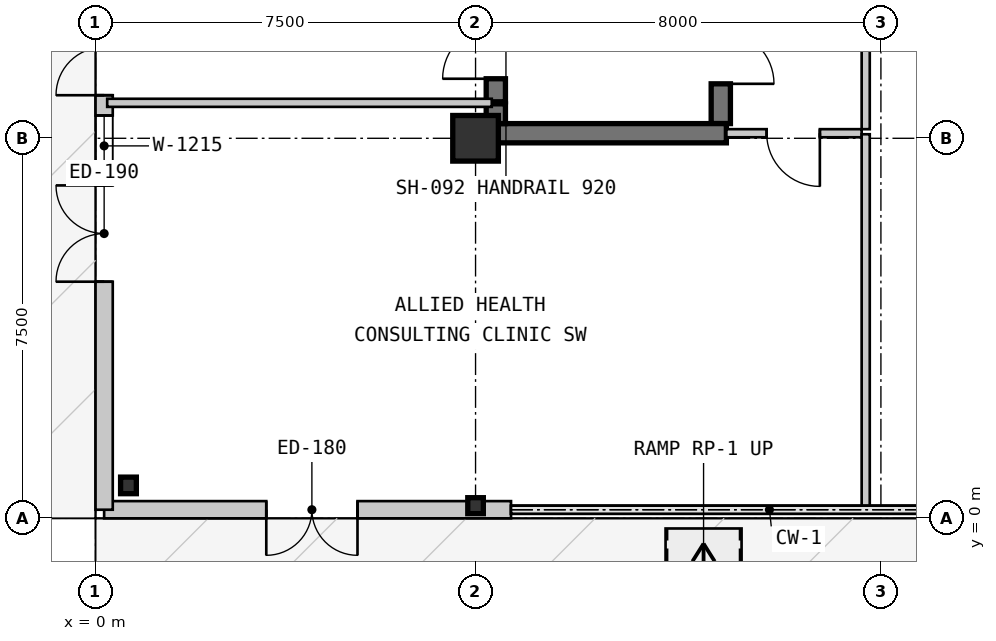
"""IFC4 building model, lengths in metres.
Left out: names, types, materials, properties, quantities, classifications, styles, units other than length and angle.
Written with IfcOpenShell. Run it as: python <this file> out.ifc"""

import sys

from ifc_helpers import new_model, si_unit, direction, frame, frame_2d, origin, origin_2d, place, context, subcontext, project, spatial, rectangle, circle, i_section, extrude, source, transform, mapped, element, fill, save


model = new_model("IFC4")
c1 = context("Model", 3, precision=1e-05, world=origin(), true_north=direction((0.0, 1.0)))
c2 = subcontext(c1, "Body", "Model", "MODEL_VIEW")
j1 = project(units=[si_unit("LENGTHUNIT", "METRE"), si_unit("PLANEANGLEUNIT", "RADIAN")], contexts=[c1])
p1 = place(None, origin())
s1 = spatial("IfcSite", under=j1, at=p1, CompositionType="ELEMENT")
p2 = place(p1, origin())
s2 = spatial("IfcBuilding", under=s1, at=p2, CompositionType="ELEMENT")
p3 = place(p2, origin())
s3 = spatial("IfcBuildingStorey", under=s2, at=p3, CompositionType="ELEMENT", Elevation=0.0)
m1 = source(origin(), c2, "Body", "SweptSolid", [
    extrude(circle(Radius=0.45, at=origin_2d()), origin(), (0.0, 0.0, 1.0), 4.55),
])
p4 = place(p3, frame((7.5, 7.5, 0.0), z_axis=(0.0, 0.0, 1.0), x_axis=(1.0, 0.0, 0.0)))
e1 = element("IfcColumn", 1, at=p4, inside=s3, PredefinedType="COLUMN", context=c2, shape_type="MappedRepresentation", body=[
    mapped(m1, transform((0.0, 0.0, 0.0), scale=1.0)),
])
m2 = source(origin(), c2, "Body", "SweptSolid", [
    extrude(i_section(OverallWidth=0.311, OverallDepth=0.327, WebThickness=0.016, FlangeThickness=0.025, at=origin_2d()), origin(), (0.0, 0.0, 1.0), 4.55),
])
p5 = place(p3, frame((0.65, 0.65, 0.0), z_axis=(0.0, 0.0, 1.0), x_axis=(1.0, 0.0, 0.0)))
e2 = element("IfcColumn", 2, at=p5, inside=s3, PredefinedType="COLUMN", context=c2, shape_type="MappedRepresentation", body=[
    mapped(m2, transform((0.0, 0.0, 0.0), scale=1.0)),
])
m3 = source(origin(), c2, "Body", "SweptSolid", [
    extrude(i_section(OverallWidth=0.307, OverallDepth=0.315, WebThickness=0.012, FlangeThickness=0.019, at=origin_2d()), origin(), (0.0, 0.0, 1.0), 4.55),
])
p6 = place(p3, frame((7.5, 0.25, 0.0), z_axis=(0.0, 0.0, 1.0), x_axis=(1.0, 0.0, 0.0)))
e3 = element("IfcColumn", 3, at=p6, inside=s3, PredefinedType="PILASTER", context=c2, shape_type="MappedRepresentation", body=[
    mapped(m3, transform((0.0, 0.0, 0.0), scale=1.0)),
])
m4 = source(origin(), c2, "Body", "SweptSolid", [
    extrude(rectangle(XDim=8.03, YDim=0.34, at=frame_2d((4.015, 0.0))), origin(), (0.0, 0.0, 1.0), 4.29),
])
p7 = place(p3, frame((0.17, 0.17, 0.0), z_axis=(0.0, 0.0, 1.0), x_axis=(1.0, 0.0, 0.0)))
e4 = element("IfcWall", 4, at=p7, inside=s3, PredefinedType="SOLIDWALL", context=c2, shape_type="MappedRepresentation", body=[
    mapped(m4, transform((0.0, 0.0, 0.0), scale=1.0)),
])
m5 = source(origin(), c2, "Body", "SweptSolid", [
    extrude(rectangle(XDim=1.8, YDim=2.3, at=frame_2d((0.9, 1.15))), frame((0.0, 0.18, 0.0), z_axis=(0.0, -1.0, 0.0), x_axis=(1.0, 0.0, 0.0)), (0.0, 0.0, 1.0), 0.36),
])
p8 = place(p7, frame((3.2, 0.0, 0.0)))
e5 = element("IfcOpeningElement", 5, at=p8, cuts=e4, PredefinedType="OPENING", context=c2, shape_type="MappedRepresentation", body=[
    mapped(m5, transform((0.0, 0.0, 0.0), scale=1.0)),
])
m6 = source(origin(), c2, "Body", "SweptSolid", [
    extrude(rectangle(XDim=39.66, YDim=0.34, at=frame_2d((19.83, 0.0))), origin(), (0.0, 0.0, 1.0), 4.29),
])
p9 = place(p3, frame((0.17, 0.17, 0.0), z_axis=(0.0, 0.0, 1.0), x_axis=(0.0, 1.0, 0.0)))
e6 = element("IfcWall", 6, at=p9, inside=s3, PredefinedType="SOLIDWALL", context=c2, shape_type="MappedRepresentation", body=[
    mapped(m6, transform((0.0, 0.0, 0.0), scale=1.0)),
])
m7 = source(origin(), c2, "Body", "SweptSolid", [
    extrude(rectangle(XDim=1.9, YDim=2.4, at=frame_2d((0.95, 1.2))), frame((0.0, 0.18, 0.0), z_axis=(0.0, -1.0, 0.0), x_axis=(1.0, 0.0, 0.0)), (0.0, 0.0, 1.0), 0.36),
])
p10 = place(p9, frame((4.5, 0.0, 0.0)))
e7 = element("IfcOpeningElement", 7, at=p10, cuts=e6, PredefinedType="OPENING", context=c2, shape_type="MappedRepresentation", body=[
    mapped(m7, transform((0.0, 0.0, 0.0), scale=1.0)),
])
p11 = place(p9, frame((17.5, 0.0, 0.0)))
e8 = element("IfcOpeningElement", 8, at=p11, cuts=e6, PredefinedType="OPENING", context=c2, shape_type="MappedRepresentation", body=[
    mapped(m7, transform((0.0, 0.0, 0.0), scale=1.0)),
])
p12 = place(p9, frame((28.0, 0.0, 0.0)))
e9 = element("IfcOpeningElement", 9, at=p12, cuts=e6, PredefinedType="OPENING", context=c2, shape_type="MappedRepresentation", body=[
    mapped(m7, transform((0.0, 0.0, 0.0), scale=1.0)),
])
p13 = place(p9, frame((8.18, 0.0, 0.0)))
e10 = element("IfcOpeningElement", 10, at=p13, cuts=e6, PredefinedType="OPENING", context=c2, shape_type="MappedRepresentation", body=[
    mapped(m7, transform((0.0, 0.0, 0.0), scale=1.0)),
])
m8 = source(origin(), c2, "Body", "SweptSolid", [
    extrude(rectangle(XDim=1.2, YDim=1.5, at=frame_2d((0.6, 0.75))), frame((0.0, 0.18, 0.0), z_axis=(0.0, -1.0, 0.0), x_axis=(1.0, 0.0, 0.0)), (0.0, 0.0, 1.0), 0.36),
])
p14 = place(p9, frame((6.58, 0.0, 0.95)))
e11 = element("IfcOpeningElement", 11, at=p14, cuts=e6, PredefinedType="OPENING", context=c2, shape_type="MappedRepresentation", body=[
    mapped(m8, transform((0.0, 0.0, 0.0), scale=1.0)),
])
m9 = source(origin(), c2, "Body", "SweptSolid", [
    extrude(rectangle(XDim=2.1, YDim=1.6, at=frame_2d((1.05, 0.8))), frame((0.0, 0.18, 0.0), z_axis=(0.0, -1.0, 0.0), x_axis=(1.0, 0.0, 0.0)), (0.0, 0.0, 1.0), 0.36),
])
p15 = place(p9, frame((34.0, 0.0, 0.95)))
e12 = element("IfcOpeningElement", 12, at=p15, cuts=e6, PredefinedType="OPENING", context=c2, shape_type="MappedRepresentation", body=[
    mapped(m9, transform((0.0, 0.0, 0.0), scale=1.0)),
])
m10 = source(origin(), c2, "Body", "SweptSolid", [
    extrude(rectangle(XDim=8.22, YDim=0.38, at=frame_2d((4.11, 0.0))), origin(), (0.0, 0.0, 1.0), 4.29),
])
p16 = place(p3, frame((12.34, 16.01, 0.0), z_axis=(0.0, 0.0, 1.0), x_axis=(0.0, -1.0, 0.0)))
e13 = element("IfcWall", 13, at=p16, inside=s3, PredefinedType="SHEAR", context=c2, shape_type="MappedRepresentation", body=[
    mapped(m10, transform((0.0, 0.0, 0.0), scale=1.0)),
])
m11 = source(origin(), c2, "Body", "SweptSolid", [
    extrude(rectangle(XDim=1.05, YDim=2.1, at=frame_2d((0.525, 1.05))), frame((0.0, 0.2, 0.0), z_axis=(0.0, -1.0, 0.0), x_axis=(1.0, 0.0, 0.0)), (0.0, 0.0, 1.0), 0.4),
])
p17 = place(p16, frame((6.385, 0.0, 0.0)))
e14 = element("IfcOpeningElement", 14, at=p17, cuts=e13, PredefinedType="OPENING", context=c2, shape_type="MappedRepresentation", body=[
    mapped(m11, transform((0.0, 0.0, 0.0), scale=1.0)),
])
m12 = source(origin(), c2, "Body", "SweptSolid", [
    extrude(rectangle(XDim=4.66, YDim=0.38, at=frame_2d((2.33, 0.0))), origin(), (0.0, 0.0, 1.0), 4.29),
])
p18 = place(p3, frame((12.45, 7.6, 0.0), z_axis=(0.0, 0.0, 1.0), x_axis=(-1.0, 0.0, 0.0)))
e15 = element("IfcWall", 15, at=p18, inside=s3, PredefinedType="SHEAR", context=c2, shape_type="MappedRepresentation", body=[
    mapped(m12, transform((0.0, 0.0, 0.0), scale=1.0)),
])
m13 = source(origin(), c2, "Body", "SweptSolid", [
    extrude(rectangle(XDim=0.39, YDim=0.38, at=frame_2d((0.195, 0.0))), origin(), (0.0, 0.0, 1.0), 4.29),
])
p19 = place(p3, frame((7.9, 7.79, 0.0), z_axis=(0.0, 0.0, 1.0), x_axis=(0.0, 1.0, 0.0)))
e16 = element("IfcWall", 16, at=p19, inside=s3, PredefinedType="SHEAR", context=c2, shape_type="MappedRepresentation", body=[
    mapped(m13, transform((0.0, 0.0, 0.0), scale=1.0)),
])
m14 = source(origin(), c2, "Body", "SweptSolid", [
    extrude(rectangle(XDim=2.16, YDim=0.38, at=frame_2d((1.08, 0.0))), origin(), (0.0, 0.0, 1.0), 4.29),
])
p20 = place(p3, frame((7.9, 8.22, 0.0), z_axis=(0.0, 0.0, 1.0), x_axis=(0.0, 1.0, 0.0)))
e17 = element("IfcWall", 17, at=p20, inside=s3, PredefinedType="SHEAR", context=c2, shape_type="MappedRepresentation", body=[
    mapped(m14, transform((0.0, 0.0, 0.0), scale=1.0)),
])
p21 = place(p20, frame((0.455, 0.0, 0.0)))
e18 = element("IfcOpeningElement", 18, at=p21, cuts=e17, PredefinedType="OPENING", context=c2, shape_type="MappedRepresentation", body=[
    mapped(m11, transform((0.0, 0.0, 0.0), scale=1.0)),
])
m15 = source(origin(), c2, "Body", "SweptSolid", [
    extrude(rectangle(XDim=13.44, YDim=0.16, at=frame_2d((6.72, 0.0))), origin(), (0.0, 0.0, 1.0), 4.29),
])
p22 = place(p3, frame((15.2, 21.12, 0.0), z_axis=(0.0, 0.0, 1.0), x_axis=(0.0, -1.0, 0.0)))
e19 = element("IfcWall", 19, at=p22, inside=s3, PredefinedType="PARTITIONING", context=c2, shape_type="MappedRepresentation", body=[
    mapped(m15, transform((0.0, 0.0, 0.0), scale=1.0)),
])
m16 = source(origin(), c2, "Body", "SweptSolid", [
    extrude(rectangle(XDim=0.92, YDim=2.1, at=frame_2d((0.46, 1.05))), frame((0.0, 0.09, 0.0), z_axis=(0.0, -1.0, 0.0), x_axis=(1.0, 0.0, 0.0)), (0.0, 0.0, 1.0), 0.18),
])
p23 = place(p22, frame((6.23, 0.0, 0.0)))
e20 = element("IfcOpeningElement", 20, at=p23, cuts=e19, PredefinedType="OPENING", context=c2, shape_type="MappedRepresentation", body=[
    mapped(m16, transform((0.0, 0.0, 0.0), scale=1.0)),
])
m17 = source(origin(), c2, "Body", "SweptSolid", [
    extrude(rectangle(XDim=2.67, YDim=0.16, at=frame_2d((1.335, 0.0))), origin(), (0.0, 0.0, 1.0), 4.29),
])
p24 = place(p3, frame((15.12, 7.6, 0.0), z_axis=(0.0, 0.0, 1.0), x_axis=(-1.0, 0.0, 0.0)))
e21 = element("IfcWall", 21, at=p24, inside=s3, PredefinedType="PARTITIONING", context=c2, shape_type="MappedRepresentation", body=[
    mapped(m17, transform((0.0, 0.0, 0.0), scale=1.0)),
])
m18 = source(origin(), c2, "Body", "SweptSolid", [
    extrude(rectangle(XDim=1.05, YDim=2.1, at=frame_2d((0.525, 1.05))), frame((0.0, 0.09, 0.0), z_axis=(0.0, -1.0, 0.0), x_axis=(1.0, 0.0, 0.0)), (0.0, 0.0, 1.0), 0.18),
])
p25 = place(p24, frame((0.825, 0.0, 0.0)))
e22 = element("IfcOpeningElement", 22, at=p25, cuts=e21, PredefinedType="OPENING", context=c2, shape_type="MappedRepresentation", body=[
    mapped(m18, transform((0.0, 0.0, 0.0), scale=1.0)),
])
m19 = source(origin(), c2, "Body", "SweptSolid", [
    extrude(rectangle(XDim=7.35, YDim=0.16, at=frame_2d((3.675, 0.0))), origin(), (0.0, 0.0, 1.0), 4.29),
])
p26 = place(p3, frame((15.2, 0.23, 0.0), z_axis=(0.0, 0.0, 1.0), x_axis=(0.0, 1.0, 0.0)))
e23 = element("IfcWall", 23, at=p26, inside=s3, PredefinedType="PARTITIONING", context=c2, shape_type="MappedRepresentation", body=[
    mapped(m19, transform((0.0, 0.0, 0.0), scale=1.0)),
])
m20 = source(origin(), c2, "Body", "SweptSolid", [
    extrude(rectangle(XDim=7.59, YDim=0.16, at=frame_2d((3.795, 0.0))), origin(), (0.0, 0.0, 1.0), 4.29),
])
p27 = place(p3, frame((0.23, 8.2, 0.0), z_axis=(0.0, 0.0, 1.0), x_axis=(1.0, 0.0, 0.0)))
e24 = element("IfcWall", 24, at=p27, inside=s3, PredefinedType="PARTITIONING", context=c2, shape_type="MappedRepresentation", body=[
    mapped(m20, transform((0.0, 0.0, 0.0), scale=1.0)),
])
m21 = source(origin(), c2, "Body", "SweptSolid", [
    extrude(rectangle(XDim=1.8, YDim=2.3, at=frame_2d((0.9, 1.15))), frame((0.0, 0.025, 0.0), z_axis=(0.0, -1.0, 0.0), x_axis=(1.0, 0.0, 0.0)), (0.0, 0.0, 1.0), 0.05),
])
p28 = place(p8, frame((1.8, 0.0, 0.0), z_axis=(0.0, 0.0, 1.0), x_axis=(-1.0, 0.0, 0.0)))
e25 = element("IfcDoor", 25, at=p28, inside=s3, OperationType="DOUBLE_DOOR_SINGLE_SWING", PredefinedType="DOOR", context=c2, shape_type="MappedRepresentation", body=[
    mapped(m21, transform((0.0, 0.0, 0.0), scale=1.0)),
])
fill(e5, e25)
m22 = source(origin(), c2, "Body", "SweptSolid", [
    extrude(rectangle(XDim=1.9, YDim=2.4, at=frame_2d((0.95, 1.2))), frame((0.0, 0.025, 0.0), z_axis=(0.0, -1.0, 0.0), x_axis=(1.0, 0.0, 0.0)), (0.0, 0.0, 1.0), 0.05),
])
p29 = place(p10, origin())
e26 = element("IfcDoor", 26, at=p29, inside=s3, OperationType="DOUBLE_DOOR_SINGLE_SWING", PredefinedType="DOOR", context=c2, shape_type="MappedRepresentation", body=[
    mapped(m22, transform((0.0, 0.0, 0.0), scale=1.0)),
])
fill(e7, e26)
p30 = place(p13, origin())
e27 = element("IfcDoor", 27, at=p30, inside=s3, OperationType="DOUBLE_DOOR_SINGLE_SWING", PredefinedType="DOOR", context=c2, shape_type="MappedRepresentation", body=[
    mapped(m22, transform((0.0, 0.0, 0.0), scale=1.0)),
])
fill(e10, e27)
m23 = source(origin(), c2, "Body", "SweptSolid", [
    extrude(rectangle(XDim=1.2, YDim=1.5, at=frame_2d((0.6, 0.75))), frame((0.0, 0.03, 0.0), z_axis=(0.0, -1.0, 0.0), x_axis=(1.0, 0.0, 0.0)), (0.0, 0.0, 1.0), 0.06),
])
p31 = place(p14, origin())
e28 = element("IfcWindow", 28, at=p31, inside=s3, PartitioningType="SINGLE_PANEL", PredefinedType="WINDOW", context=c2, shape_type="MappedRepresentation", body=[
    mapped(m23, transform((0.0, 0.0, 0.0), scale=1.0)),
])
fill(e11, e28)
m24 = source(origin(), c2, "Body", "SweptSolid", [
    extrude(rectangle(XDim=1.05, YDim=2.1, at=frame_2d((0.525, 1.05))), frame((0.0, 0.025, 0.0), z_axis=(0.0, -1.0, 0.0), x_axis=(1.0, 0.0, 0.0)), (0.0, 0.0, 1.0), 0.05),
])
p32 = place(p17, origin())
e29 = element("IfcDoor", 29, at=p32, inside=s3, OperationType="SINGLE_SWING_RIGHT", PredefinedType="DOOR", context=c2, shape_type="MappedRepresentation", body=[
    mapped(m24, transform((0.0, 0.0, 0.0), scale=1.0)),
])
fill(e14, e29)
p33 = place(p25, origin())
e30 = element("IfcDoor", 30, at=p33, inside=s3, OperationType="SINGLE_SWING_LEFT", PredefinedType="DOOR", context=c2, shape_type="MappedRepresentation", body=[
    mapped(m24, transform((0.0, 0.0, 0.0), scale=1.0)),
])
fill(e22, e30)
p34 = place(p21, origin())
e31 = element("IfcDoor", 31, at=p34, inside=s3, OperationType="SINGLE_SWING_LEFT", PredefinedType="DOOR", context=c2, shape_type="MappedRepresentation", body=[
    mapped(m24, transform((0.0, 0.0, 0.0), scale=1.0)),
])
fill(e18, e31)
save(model, sys.argv[1])
